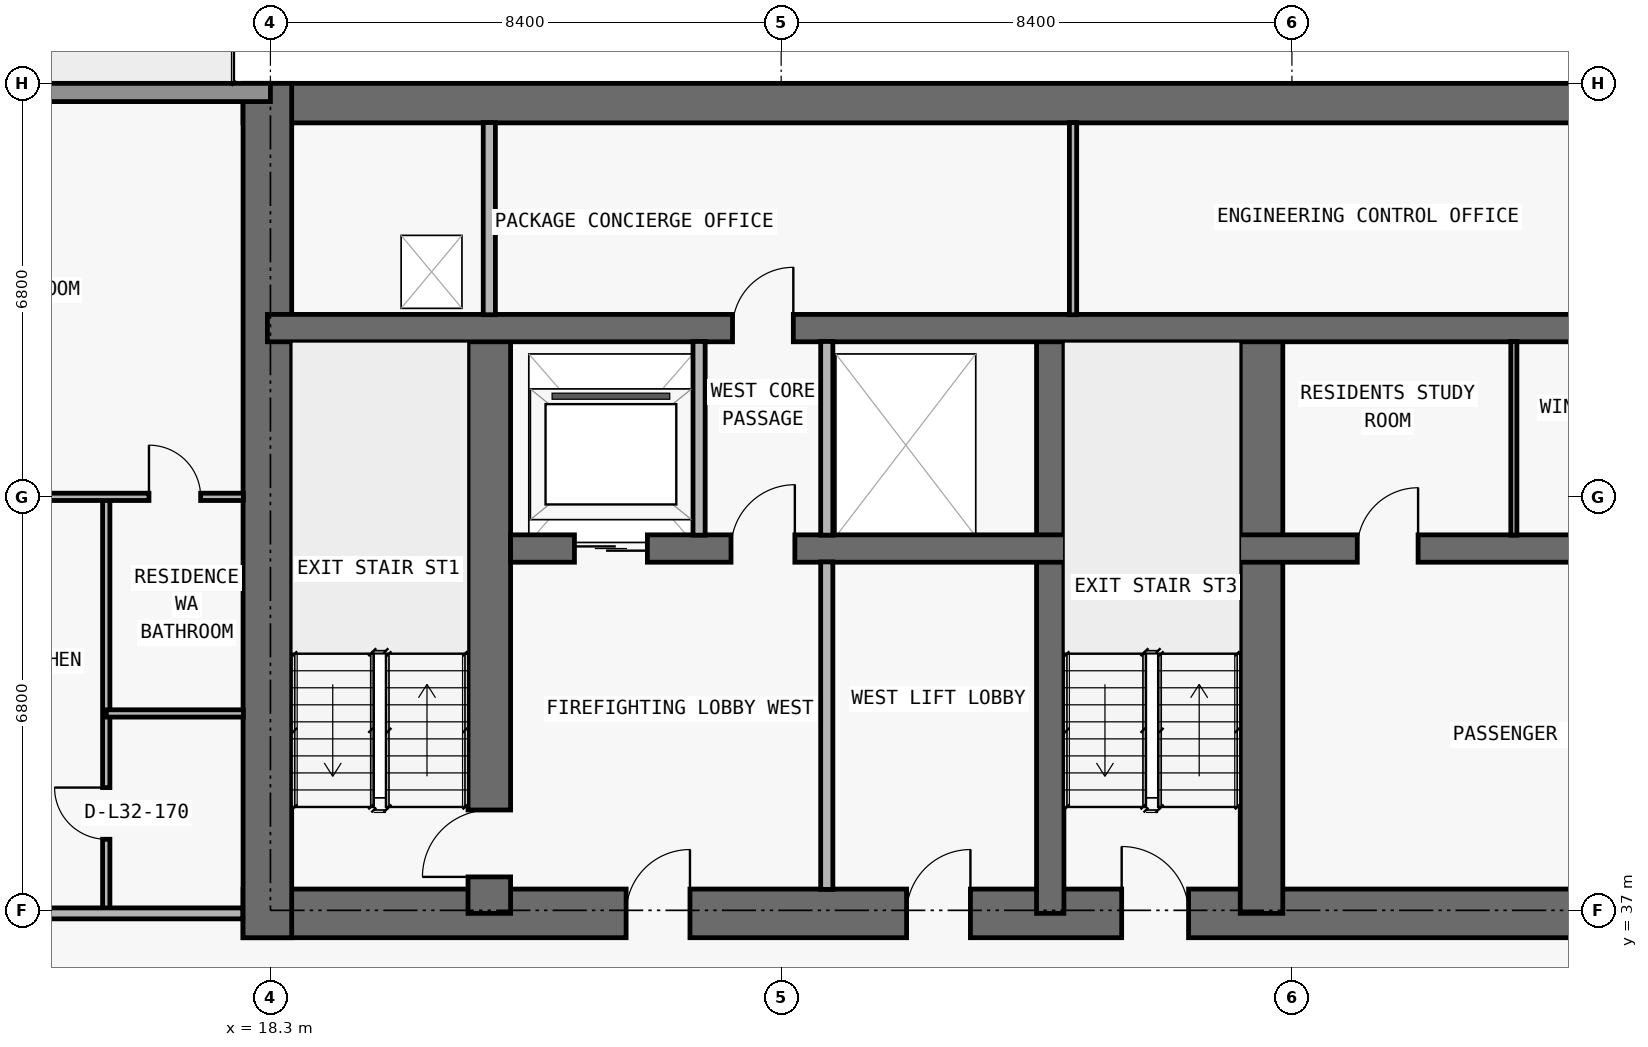
"""IFC4 building model, lengths in metres.
Left out: names, types, materials, properties, quantities, classifications, styles, units other than length and angle.
Written with IfcOpenShell. Run it as: python <this file> out.ifc"""

import sys

from ifc_helpers import new_model, si_unit, direction, frame, frame_2d, origin, place, context, subcontext, project, spatial, rectangle, extrude, element, fill, save


model = new_model("IFC4")
c1 = context("Model", 3, precision=1e-05, world=origin(), true_north=direction((0.0, 1.0)))
c2 = subcontext(c1, "Body", "Model", "MODEL_VIEW")
j1 = project(units=[si_unit("LENGTHUNIT", "METRE"), si_unit("PLANEANGLEUNIT", "RADIAN")], contexts=[c1])
p1 = place(None, origin())
s1 = spatial("IfcSite", under=j1, at=p1, CompositionType="ELEMENT")
p2 = place(p1, origin())
s2 = spatial("IfcBuilding", under=s1, at=p2, CompositionType="ELEMENT")
p3 = place(p2, frame((0.0, 0.0, 119.1)))
s3 = spatial("IfcBuildingStorey", under=s2, at=p3, CompositionType="ELEMENT", Elevation=119.1)
p4 = place(p3, frame((17.85, 36.95, 0.0), z_axis=(0.0, 0.0, 1.0), x_axis=(1.0, 0.0, 0.0)))
e1 = element("IfcWall", 1, at=p4, inside=s3, PredefinedType="SHEAR", context=c2, shape_type="SweptSolid", body=[
    extrude(rectangle(XDim=42.1, YDim=0.8, at=frame_2d((21.05, 0.0))), origin(), (0.0, 0.0, 1.0), 3.05),
])
p5 = place(p4, frame((14.45, 0.0, 0.0)))
e2 = element("IfcOpeningElement", 2, at=p5, cuts=e1, PredefinedType="OPENING", context=c2, shape_type="SweptSolid", body=[
    extrude(rectangle(XDim=1.1, YDim=2.15, at=frame_2d((0.55, 1.075))), frame((0.0, 0.41, 0.0), z_axis=(0.0, -1.0, 0.0), x_axis=(1.0, 0.0, 0.0)), (0.0, 0.0, 1.0), 0.82),
])
p6 = place(p4, frame((6.3, 0.0, 0.0)))
e3 = element("IfcOpeningElement", 3, at=p6, cuts=e1, PredefinedType="OPENING", context=c2, shape_type="SweptSolid", body=[
    extrude(rectangle(XDim=1.05, YDim=2.15, at=frame_2d((0.525, 1.075))), frame((0.0, 0.41, 0.0), z_axis=(0.0, -1.0, 0.0), x_axis=(1.0, 0.0, 0.0)), (0.0, 0.0, 1.0), 0.82),
])
p7 = place(p4, frame((34.8, 0.0, 0.0)))
e4 = element("IfcOpeningElement", 4, at=p7, cuts=e1, PredefinedType="OPENING", context=c2, shape_type="SweptSolid", body=[
    extrude(rectangle(XDim=1.05, YDim=2.15, at=frame_2d((0.525, 1.075))), frame((0.0, 0.41, 0.0), z_axis=(0.0, -1.0, 0.0), x_axis=(1.0, 0.0, 0.0)), (0.0, 0.0, 1.0), 0.82),
])
p8 = place(p4, frame((10.913, 0.0, 0.0)))
e5 = element("IfcOpeningElement", 5, at=p8, cuts=e1, PredefinedType="OPENING", context=c2, shape_type="SweptSolid", body=[
    extrude(rectangle(XDim=1.05, YDim=2.15, at=frame_2d((0.525, 1.075))), frame((0.0, 0.41, 0.0), z_axis=(0.0, -1.0, 0.0), x_axis=(1.0, 0.0, 0.0)), (0.0, 0.0, 1.0), 0.82),
])
p9 = place(p4, frame((24.15, 0.0, 0.0)))
e6 = element("IfcOpeningElement", 6, at=p9, cuts=e1, PredefinedType="OPENING", context=c2, shape_type="SweptSolid", body=[
    extrude(rectangle(XDim=1.05, YDim=2.15, at=frame_2d((0.525, 1.075))), frame((0.0, 0.41, 0.0), z_axis=(0.0, -1.0, 0.0), x_axis=(1.0, 0.0, 0.0)), (0.0, 0.0, 1.0), 0.82),
])
p10 = place(p3, frame((17.85, 50.275, 0.0), z_axis=(0.0, 0.0, 1.0), x_axis=(1.0, 0.0, 0.0)))
e7 = element("IfcWall", 7, at=p10, inside=s3, PredefinedType="SHEAR", context=c2, shape_type="SweptSolid", body=[
    extrude(rectangle(XDim=42.1, YDim=0.65, at=frame_2d((21.05, 0.0))), origin(), (0.0, 0.0, 1.0), 3.05),
])
p11 = place(p3, frame((18.25, 36.55, 0.0), z_axis=(0.0, 0.0, 1.0), x_axis=(0.0, 1.0, 0.0)))
e8 = element("IfcWall", 8, at=p11, inside=s3, PredefinedType="SHEAR", context=c2, shape_type="SweptSolid", body=[
    extrude(rectangle(XDim=14.05, YDim=0.8, at=frame_2d((7.025, 0.0))), origin(), (0.0, 0.0, 1.0), 3.05),
])
p12 = place(p3, frame((21.9, 36.95, 0.0), z_axis=(0.0, 0.0, 1.0), x_axis=(0.0, 1.0, 0.0)))
e9 = element("IfcWall", 9, at=p12, inside=s3, PredefinedType="SHEAR", context=c2, shape_type="SweptSolid", body=[
    extrude(rectangle(XDim=9.625, YDim=0.7, at=frame_2d((4.812, 0.0))), origin(), (0.0, 0.0, 1.0), 3.05),
])
p13 = place(p12, frame((0.6, 0.0, 0.0)))
e10 = element("IfcOpeningElement", 10, at=p13, cuts=e9, PredefinedType="OPENING", context=c2, shape_type="SweptSolid", body=[
    extrude(rectangle(XDim=1.1, YDim=2.15, at=frame_2d((0.55, 1.075))), frame((0.0, 0.36, 0.0), z_axis=(0.0, -1.0, 0.0), x_axis=(1.0, 0.0, 0.0)), (0.0, 0.0, 1.0), 0.72),
])
p14 = place(p3, frame((31.125, 36.95, 0.0), z_axis=(0.0, 0.0, 1.0), x_axis=(0.0, 1.0, 0.0)))
e11 = element("IfcWall", 11, at=p14, inside=s3, PredefinedType="SHEAR", context=c2, shape_type="SweptSolid", body=[
    extrude(rectangle(XDim=9.625, YDim=0.45, at=frame_2d((4.812, 0.0))), origin(), (0.0, 0.0, 1.0), 3.05),
])
p15 = place(p3, frame((34.6, 36.95, 0.0), z_axis=(0.0, 0.0, 1.0), x_axis=(0.0, 1.0, 0.0)))
e12 = element("IfcWall", 12, at=p15, inside=s3, PredefinedType="SHEAR", context=c2, shape_type="SweptSolid", body=[
    extrude(rectangle(XDim=9.625, YDim=0.7, at=frame_2d((4.812, 0.0))), origin(), (0.0, 0.0, 1.0), 3.05),
])
p16 = place(p3, frame((22.25, 42.95, 0.0), z_axis=(0.0, 0.0, 1.0), x_axis=(1.0, 0.0, 0.0)))
e13 = element("IfcWall", 13, at=p16, inside=s3, PredefinedType="SHEAR", context=c2, shape_type="SweptSolid", body=[
    extrude(rectangle(XDim=33.3, YDim=0.45, at=frame_2d((16.65, 0.0))), origin(), (0.0, 0.0, 1.0), 3.05),
])
p17 = place(p16, frame((1.05, 0.0, 0.0)))
e14 = element("IfcOpeningElement", 14, at=p17, cuts=e13, PredefinedType="OPENING", context=c2, shape_type="SweptSolid", body=[
    extrude(rectangle(XDim=1.2, YDim=2.2, at=frame_2d((0.6, 1.1))), frame((0.0, 0.235, 0.0), z_axis=(0.0, -1.0, 0.0), x_axis=(1.0, 0.0, 0.0)), (0.0, 0.0, 1.0), 0.47),
])
p18 = place(p16, frame((31.05, 0.0, 0.0)))
e15 = element("IfcOpeningElement", 15, at=p18, cuts=e13, PredefinedType="OPENING", context=c2, shape_type="SweptSolid", body=[
    extrude(rectangle(XDim=1.2, YDim=2.2, at=frame_2d((0.6, 1.1))), frame((0.0, 0.235, 0.0), z_axis=(0.0, -1.0, 0.0), x_axis=(1.0, 0.0, 0.0)), (0.0, 0.0, 1.0), 0.47),
])
p19 = place(p16, frame((21.4, 0.0, 0.0)))
e16 = element("IfcOpeningElement", 16, at=p19, cuts=e13, PredefinedType="OPENING", context=c2, shape_type="SweptSolid", body=[
    extrude(rectangle(XDim=1.1, YDim=2.2, at=frame_2d((0.55, 1.1))), frame((0.0, 0.235, 0.0), z_axis=(0.0, -1.0, 0.0), x_axis=(1.0, 0.0, 0.0)), (0.0, 0.0, 1.0), 0.47),
])
p20 = place(p16, frame((24.0, 0.0, 0.0)))
e17 = element("IfcOpeningElement", 17, at=p20, cuts=e13, PredefinedType="OPENING", context=c2, shape_type="SweptSolid", body=[
    extrude(rectangle(XDim=1.1, YDim=2.2, at=frame_2d((0.55, 1.1))), frame((0.0, 0.235, 0.0), z_axis=(0.0, -1.0, 0.0), x_axis=(1.0, 0.0, 0.0)), (0.0, 0.0, 1.0), 0.47),
])
p21 = place(p16, frame((3.625, 0.0, 0.0)))
e18 = element("IfcOpeningElement", 18, at=p21, cuts=e13, PredefinedType="OPENING", context=c2, shape_type="SweptSolid", body=[
    extrude(rectangle(XDim=1.05, YDim=2.15, at=frame_2d((0.525, 1.075))), frame((0.0, 0.235, 0.0), z_axis=(0.0, -1.0, 0.0), x_axis=(1.0, 0.0, 0.0)), (0.0, 0.0, 1.0), 0.47),
])
p22 = place(p16, frame((28.675, 0.0, 0.0)))
e19 = element("IfcOpeningElement", 19, at=p22, cuts=e13, PredefinedType="OPENING", context=c2, shape_type="SweptSolid", body=[
    extrude(rectangle(XDim=1.05, YDim=2.15, at=frame_2d((0.525, 1.075))), frame((0.0, 0.235, 0.0), z_axis=(0.0, -1.0, 0.0), x_axis=(1.0, 0.0, 0.0)), (0.0, 0.0, 1.0), 0.47),
])
p23 = place(p16, frame((13.925, 0.0, 0.0)))
e20 = element("IfcOpeningElement", 20, at=p23, cuts=e13, PredefinedType="OPENING", context=c2, shape_type="SweptSolid", body=[
    extrude(rectangle(XDim=1.0, YDim=2.2, at=frame_2d((0.5, 1.1))), frame((0.0, 0.235, 0.0), z_axis=(0.0, -1.0, 0.0), x_axis=(1.0, 0.0, 0.0)), (0.0, 0.0, 1.0), 0.47),
])
p24 = place(p16, frame((18.05, 0.0, 0.0)))
e21 = element("IfcOpeningElement", 21, at=p24, cuts=e13, PredefinedType="OPENING", context=c2, shape_type="SweptSolid", body=[
    extrude(rectangle(XDim=1.0, YDim=2.2, at=frame_2d((0.5, 1.1))), frame((0.0, 0.235, 0.0), z_axis=(0.0, -1.0, 0.0), x_axis=(1.0, 0.0, 0.0)), (0.0, 0.0, 1.0), 0.47),
])
p25 = place(p3, frame((18.25, 46.575, 0.0), z_axis=(0.0, 0.0, 1.0), x_axis=(1.0, 0.0, 0.0)))
e22 = element("IfcWall", 22, at=p25, inside=s3, PredefinedType="SHEAR", context=c2, shape_type="SweptSolid", body=[
    extrude(rectangle(XDim=41.3, YDim=0.45, at=frame_2d((20.65, 0.0))), origin(), (0.0, 0.0, 1.0), 3.05),
])
p26 = place(p25, frame((7.65, 0.0, 0.0)))
e23 = element("IfcOpeningElement", 23, at=p26, cuts=e22, PredefinedType="OPENING", context=c2, shape_type="SweptSolid", body=[
    extrude(rectangle(XDim=1.0, YDim=2.2, at=frame_2d((0.5, 1.1))), frame((0.0, 0.235, 0.0), z_axis=(0.0, -1.0, 0.0), x_axis=(1.0, 0.0, 0.0)), (0.0, 0.0, 1.0), 0.47),
])
p27 = place(p25, frame((32.675, 0.0, 0.0)))
e24 = element("IfcOpeningElement", 24, at=p27, cuts=e22, PredefinedType="OPENING", context=c2, shape_type="SweptSolid", body=[
    extrude(rectangle(XDim=1.05, YDim=2.15, at=frame_2d((0.525, 1.075))), frame((0.0, 0.235, 0.0), z_axis=(0.0, -1.0, 0.0), x_axis=(1.0, 0.0, 0.0)), (0.0, 0.0, 1.0), 0.47),
])
p28 = place(p3, frame((7.7, 50.45, 0.0), z_axis=(0.0, 0.0, 1.0), x_axis=(1.0, 0.0, 0.0)))
e25 = element("IfcWall", 25, at=p28, inside=s3, PredefinedType="STANDARD", context=c2, shape_type="SweptSolid", body=[
    extrude(rectangle(XDim=10.6, YDim=0.3, at=frame_2d((5.3, 0.0))), origin(), (0.0, 0.0, 1.0), 3.05),
])
p29 = place(p28, frame((4.3, 0.0, 0.0)))
e26 = element("IfcOpeningElement", 26, at=p29, cuts=e25, PredefinedType="OPENING", context=c2, shape_type="SweptSolid", body=[
    extrude(rectangle(XDim=2.0, YDim=2.3, at=frame_2d((1.0, 1.15))), frame((0.0, 0.16, 0.0), z_axis=(0.0, -1.0, 0.0), x_axis=(1.0, 0.0, 0.0)), (0.0, 0.0, 1.0), 0.32),
])
p30 = place(p3, frame((15.6, 36.95, 0.0), z_axis=(0.0, 0.0, 1.0), x_axis=(0.0, 1.0, 0.0)))
e27 = element("IfcWall", 27, at=p30, inside=s3, PredefinedType="PARTITIONING", context=c2, shape_type="SweptSolid", body=[
    extrude(rectangle(XDim=6.85, YDim=0.12, at=frame_2d((3.425, 0.0))), origin(), (0.0, 0.0, 1.0), 2.578),
])
p31 = place(p30, frame((1.219, 0.0, 0.0)))
e28 = element("IfcOpeningElement", 28, at=p31, cuts=e27, PredefinedType="OPENING", context=c2, shape_type="SweptSolid", body=[
    extrude(rectangle(XDim=0.85, YDim=2.1, at=frame_2d((0.425, 1.05))), frame((0.0, 0.07, 0.0), z_axis=(0.0, -1.0, 0.0), x_axis=(1.0, 0.0, 0.0)), (0.0, 0.0, 1.0), 0.14),
])
p32 = place(p3, frame((21.9, 46.795, 0.0), z_axis=(0.0, 0.0, 1.0), x_axis=(0.0, 1.0, 0.0)))
e29 = element("IfcWall", 29, at=p32, inside=s3, PredefinedType="PARTITIONING", context=c2, shape_type="SweptSolid", body=[
    extrude(rectangle(XDim=3.16, YDim=0.2, at=frame_2d((1.58, 0.0))), origin(), (0.0, 0.0, 1.0), 3.05),
])
p33 = place(p3, frame((25.35, 43.17, 0.0), z_axis=(0.0, 0.0, 1.0), x_axis=(0.0, 1.0, 0.0)))
e30 = element("IfcWall", 30, at=p33, inside=s3, PredefinedType="PARTITIONING", context=c2, shape_type="SweptSolid", body=[
    extrude(rectangle(XDim=3.185, YDim=0.2, at=frame_2d((1.593, 0.0))), origin(), (0.0, 0.0, 1.0), 3.05),
])
p34 = place(p3, frame((27.45, 37.345, 0.0), z_axis=(0.0, 0.0, 1.0), x_axis=(0.0, 1.0, 0.0)))
e31 = element("IfcWall", 31, at=p34, inside=s3, PredefinedType="PARTITIONING", context=c2, shape_type="SweptSolid", body=[
    extrude(rectangle(XDim=5.385, YDim=0.2, at=frame_2d((2.692, 0.0))), origin(), (0.0, 0.0, 1.0), 3.05),
])
p35 = place(p3, frame((27.45, 43.17, 0.0), z_axis=(0.0, 0.0, 1.0), x_axis=(0.0, 1.0, 0.0)))
e32 = element("IfcWall", 32, at=p35, inside=s3, PredefinedType="PARTITIONING", context=c2, shape_type="SweptSolid", body=[
    extrude(rectangle(XDim=3.185, YDim=0.2, at=frame_2d((1.593, 0.0))), origin(), (0.0, 0.0, 1.0), 3.05),
])
p36 = place(p3, frame((31.5, 46.795, 0.0), z_axis=(0.0, 0.0, 1.0), x_axis=(0.0, 1.0, 0.0)))
e33 = element("IfcWall", 33, at=p36, inside=s3, PredefinedType="PARTITIONING", context=c2, shape_type="SweptSolid", body=[
    extrude(rectangle(XDim=3.16, YDim=0.12, at=frame_2d((1.58, 0.0))), origin(), (0.0, 0.0, 1.0), 3.05),
])
p37 = place(p3, frame((38.75, 43.17, 0.0), z_axis=(0.0, 0.0, 1.0), x_axis=(0.0, 1.0, 0.0)))
e34 = element("IfcWall", 34, at=p37, inside=s3, PredefinedType="MOVABLE", context=c2, shape_type="SweptSolid", body=[
    extrude(rectangle(XDim=3.185, YDim=0.1, at=frame_2d((1.593, 0.0))), origin(), (0.0, 0.0, 1.0), 3.05),
])
p38 = place(p3, frame((7.7, 36.95, 0.0), z_axis=(0.0, 0.0, 1.0), x_axis=(1.0, 0.0, 0.0)))
e35 = element("IfcWall", 35, at=p38, inside=s3, PredefinedType="PARTITIONING", context=c2, shape_type="SweptSolid", body=[
    extrude(rectangle(XDim=10.145, YDim=0.18, at=frame_2d((5.073, 0.0))), origin(), (0.0, 0.0, 1.0), 3.05),
])
p39 = place(p38, frame((5.188, 0.0, 0.0)))
e36 = element("IfcOpeningElement", 36, at=p39, cuts=e35, PredefinedType="OPENING", context=c2, shape_type="SweptSolid", body=[
    extrude(rectangle(XDim=1.0, YDim=2.2, at=frame_2d((0.5, 1.1))), frame((0.0, 0.1, 0.0), z_axis=(0.0, -1.0, 0.0), x_axis=(1.0, 0.0, 0.0)), (0.0, 0.0, 1.0), 0.2),
])
p40 = place(p3, frame((15.6, 40.238, 0.0), z_axis=(0.0, 0.0, 1.0), x_axis=(1.0, 0.0, 0.0)))
e37 = element("IfcWall", 37, at=p40, inside=s3, PredefinedType="PARTITIONING", context=c2, shape_type="SweptSolid", body=[
    extrude(rectangle(XDim=2.255, YDim=0.12, at=frame_2d((1.127, 0.0))), origin(), (0.0, 0.0, 1.0), 3.05),
])
p41 = place(p3, frame((4.195, 43.8, 0.0), z_axis=(0.0, 0.0, 1.0), x_axis=(1.0, 0.0, 0.0)))
e38 = element("IfcWall", 38, at=p41, inside=s3, PredefinedType="PARTITIONING", context=c2, shape_type="SweptSolid", body=[
    extrude(rectangle(XDim=13.66, YDim=0.12, at=frame_2d((6.83, 0.0))), origin(), (0.0, 0.0, 1.0), 2.339),
])
p42 = place(p41, frame((8.743, 0.0, 0.0)))
e39 = element("IfcOpeningElement", 39, at=p42, cuts=e38, PredefinedType="OPENING", context=c2, shape_type="SweptSolid", body=[
    extrude(rectangle(XDim=0.9, YDim=2.15, at=frame_2d((0.45, 1.075))), frame((0.0, 0.07, 0.0), z_axis=(0.0, -1.0, 0.0), x_axis=(1.0, 0.0, 0.0)), (0.0, 0.0, 1.0), 0.14),
])
p43 = place(p41, frame((12.107, 0.0, 0.0)))
e40 = element("IfcOpeningElement", 40, at=p43, cuts=e38, PredefinedType="OPENING", context=c2, shape_type="SweptSolid", body=[
    extrude(rectangle(XDim=0.85, YDim=2.1, at=frame_2d((0.425, 1.05))), frame((0.0, 0.07, 0.0), z_axis=(0.0, -1.0, 0.0), x_axis=(1.0, 0.0, 0.0)), (0.0, 0.0, 1.0), 0.14),
])
p44 = place(p17, origin())
e41 = element("IfcDoor", 41, at=p44, inside=s3, OperationType="DOUBLE_DOOR_SLIDING", PredefinedType="DOOR", context=c2, shape_type="SweptSolid", body=[
    extrude(rectangle(XDim=1.2, YDim=2.2, at=frame_2d((0.6, 1.1))), frame((0.0, 0.025, 0.0), z_axis=(0.0, -1.0, 0.0), x_axis=(1.0, 0.0, 0.0)), (0.0, 0.0, 1.0), 0.05),
])
fill(e14, e41)
p45 = place(p5, origin())
e42 = element("IfcDoor", 42, at=p45, inside=s3, OperationType="SINGLE_SWING_LEFT", PredefinedType="DOOR", context=c2, shape_type="SweptSolid", body=[
    extrude(rectangle(XDim=1.1, YDim=2.15, at=frame_2d((0.55, 1.075))), frame((0.0, 0.025, 0.0), z_axis=(0.0, -1.0, 0.0), x_axis=(1.0, 0.0, 0.0)), (0.0, 0.0, 1.0), 0.05),
])
fill(e2, e42)
p46 = place(p6, origin())
e43 = element("IfcDoor", 43, at=p46, inside=s3, OperationType="SINGLE_SWING_RIGHT", PredefinedType="DOOR", context=c2, shape_type="SweptSolid", body=[
    extrude(rectangle(XDim=1.05, YDim=2.15, at=frame_2d((0.525, 1.075))), frame((0.0, 0.025, 0.0), z_axis=(0.0, -1.0, 0.0), x_axis=(1.0, 0.0, 0.0)), (0.0, 0.0, 1.0), 0.05),
])
fill(e3, e43)
p47 = place(p13, origin())
e44 = element("IfcDoor", 44, at=p47, inside=s3, OperationType="SINGLE_SWING_LEFT", PredefinedType="DOOR", context=c2, shape_type="SweptSolid", body=[
    extrude(rectangle(XDim=1.1, YDim=2.15, at=frame_2d((0.55, 1.075))), frame((0.0, 0.025, 0.0), z_axis=(0.0, -1.0, 0.0), x_axis=(1.0, 0.0, 0.0)), (0.0, 0.0, 1.0), 0.05),
])
fill(e10, e44)
p48 = place(p21, origin())
e45 = element("IfcDoor", 45, at=p48, inside=s3, OperationType="SINGLE_SWING_RIGHT", PredefinedType="DOOR", context=c2, shape_type="SweptSolid", body=[
    extrude(rectangle(XDim=1.05, YDim=2.15, at=frame_2d((0.525, 1.075))), frame((0.0, 0.025, 0.0), z_axis=(0.0, -1.0, 0.0), x_axis=(1.0, 0.0, 0.0)), (0.0, 0.0, 1.0), 0.05),
])
fill(e18, e45)
p49 = place(p8, origin())
e46 = element("IfcDoor", 46, at=p49, inside=s3, OperationType="SINGLE_SWING_RIGHT", PredefinedType="DOOR", context=c2, shape_type="SweptSolid", body=[
    extrude(rectangle(XDim=1.05, YDim=2.15, at=frame_2d((0.525, 1.075))), frame((0.0, 0.025, 0.0), z_axis=(0.0, -1.0, 0.0), x_axis=(1.0, 0.0, 0.0)), (0.0, 0.0, 1.0), 0.05),
])
fill(e5, e46)
p50 = place(p23, origin())
e47 = element("IfcDoor", 47, at=p50, inside=s3, OperationType="SINGLE_SWING_RIGHT", PredefinedType="DOOR", context=c2, shape_type="SweptSolid", body=[
    extrude(rectangle(XDim=1.0, YDim=2.2, at=frame_2d((0.5, 1.1))), frame((0.0, 0.025, 0.0), z_axis=(0.0, -1.0, 0.0), x_axis=(1.0, 0.0, 0.0)), (0.0, 0.0, 1.0), 0.05),
])
fill(e20, e47)
p51 = place(p26, origin())
e48 = element("IfcDoor", 48, at=p51, inside=s3, OperationType="SINGLE_SWING_RIGHT", PredefinedType="DOOR", context=c2, shape_type="SweptSolid", body=[
    extrude(rectangle(XDim=1.0, YDim=2.2, at=frame_2d((0.5, 1.1))), frame((0.0, 0.025, 0.0), z_axis=(0.0, -1.0, 0.0), x_axis=(1.0, 0.0, 0.0)), (0.0, 0.0, 1.0), 0.05),
])
fill(e23, e48)
p52 = place(p31, origin())
e49 = element("IfcDoor", 49, at=p52, inside=s3, OperationType="SINGLE_SWING_RIGHT", PredefinedType="DOOR", context=c2, shape_type="SweptSolid", body=[
    extrude(rectangle(XDim=0.85, YDim=2.1, at=frame_2d((0.425, 1.05))), frame((0.0, 0.025, 0.0), z_axis=(0.0, -1.0, 0.0), x_axis=(1.0, 0.0, 0.0)), (0.0, 0.0, 1.0), 0.05),
])
fill(e28, e49)
p53 = place(p43, origin())
e50 = element("IfcDoor", 50, at=p53, inside=s3, OperationType="SINGLE_SWING_LEFT", PredefinedType="DOOR", context=c2, shape_type="SweptSolid", body=[
    extrude(rectangle(XDim=0.85, YDim=2.1, at=frame_2d((0.425, 1.05))), frame((0.0, 0.025, 0.0), z_axis=(0.0, -1.0, 0.0), x_axis=(1.0, 0.0, 0.0)), (0.0, 0.0, 1.0), 0.05),
])
fill(e40, e50)
save(model, sys.argv[1])
